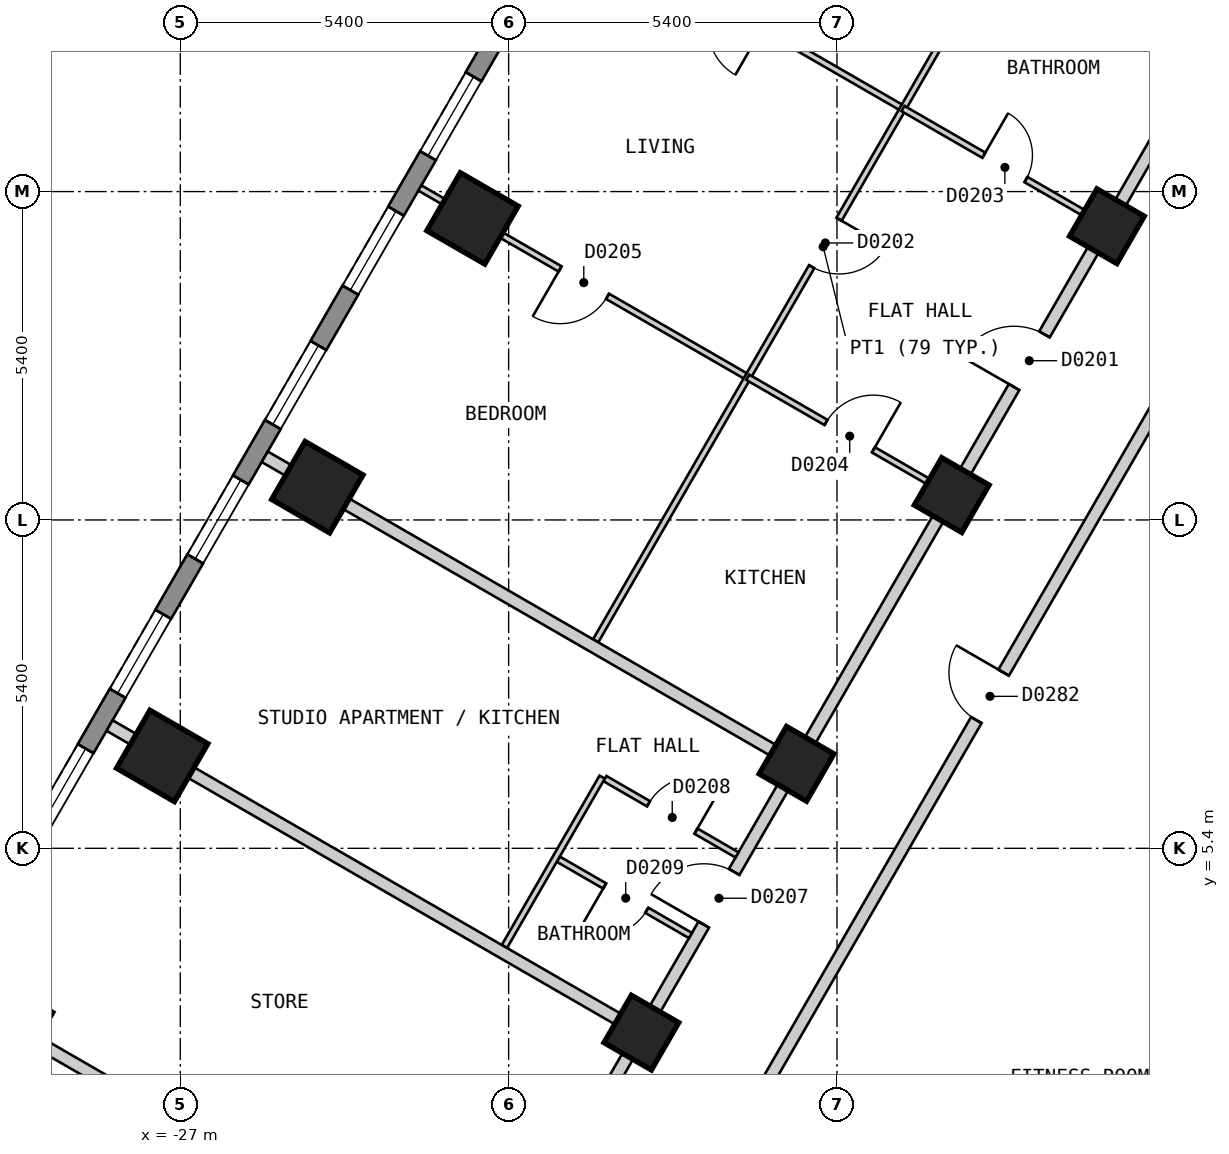
"""IFC4 building model, lengths in metres.
Left out: names, types, materials, properties, quantities, classifications, styles, units other than length and angle.
Written with IfcOpenShell. Run it as: python <this file> out.ifc"""

import sys

from ifc_helpers import new_model, si_unit, direction, frame, frame_2d, origin, origin_2d, place, context, subcontext, project, spatial, polyline, rectangle, outline, extrude, element, fill, save


model = new_model("IFC4")
c1 = context("Model", 3, precision=1e-05, world=origin(), true_north=direction((0.0, 1.0)))
c2 = subcontext(c1, "Body", "Model", "MODEL_VIEW")
j1 = project(units=[si_unit("LENGTHUNIT", "METRE"), si_unit("PLANEANGLEUNIT", "RADIAN")], contexts=[c1])
p1 = place(None, origin())
s1 = spatial("IfcSite", under=j1, at=p1, CompositionType="ELEMENT")
p2 = place(p1, origin())
s2 = spatial("IfcBuilding", under=s1, at=p2, CompositionType="ELEMENT")
p3 = place(p2, frame((0.0, 0.0, 41.4)))
s3 = spatial("IfcBuildingStorey", under=s2, at=p3, CompositionType="ELEMENT", Elevation=41.4)
for number, where, z_axis, x_axis in (
    (1, (-22.194, 15.759, 0.0), (0.0, 0.0, 1.0), (-0.5, -0.866, 0.0)),
    (2, (-24.746, 11.339, 0.0), (0.0, 0.0, 1.0), (-0.5, -0.866, 0.0)),
    (3, (-27.298, 6.919, 0.0), (0.0, 0.0, 1.0), (-0.5, -0.866, 0.0)),
    (4, (-29.849, 2.499, 0.0), (0.0, 0.0, 1.0), (-0.5, -0.866, 0.0)),
):
    element("IfcColumn", number, at=place(p3, frame(where, z_axis=z_axis, x_axis=x_axis)), inside=s3, PredefinedType="COLUMN", context=c2, shape_type="SweptSolid", body=[
        extrude(rectangle(XDim=1.1, YDim=1.1, at=origin_2d()), origin(), (0.0, 0.0, 1.0), 3.0),
    ])
for number, where, z_axis, x_axis in (
    (5, (-11.761, 15.63, 0.0), (0.0, 0.0, 1.0), (-0.5, -0.866, 0.0)),
    (6, (-14.313, 11.209, 0.0), (0.0, 0.0, 1.0), (-0.5, -0.866, 0.0)),
    (7, (-16.865, 6.789, 0.0), (0.0, 0.0, 1.0), (-0.5, -0.866, 0.0)),
    (8, (-19.417, 2.369, 0.0), (0.0, 0.0, 1.0), (-0.5, -0.866, 0.0)),
):
    element("IfcColumn", number, at=place(p3, frame(where, z_axis=z_axis, x_axis=x_axis)), inside=s3, PredefinedType="COLUMN", context=c2, shape_type="SweptSolid", body=[
        extrude(rectangle(XDim=0.9, YDim=0.9, at=origin_2d()), origin(), (0.0, 0.0, 1.0), 3.0),
    ])
p4 = place(p3, frame((-17.71, 25.825, 0.0), z_axis=(0.0, 0.0, 1.0), x_axis=(-0.500001938803, -0.866024284413, 0.0)))
e9 = element("IfcWall", 9, at=p4, inside=s3, PredefinedType="SOLIDWALL", context=c2, shape_type="SweptSolid", body=[
    extrude(outline(polyline([(0.0, -0.15), (27.02, -0.15), (26.94, 0.15), (0.08, 0.15), (0.0, -0.15)])), origin(), (0.0, 0.0, 1.0), 2.7),
])
p5 = place(p4, frame((1.277, 0.0, 0.15)))
e10 = element("IfcOpeningElement", 10, at=p5, cuts=e9, PredefinedType="OPENING", context=c2, shape_type="SweptSolid", body=[
    extrude(rectangle(XDim=1.5, YDim=2.1, at=frame_2d((0.75, 1.05))), frame((0.0, 0.16, 0.0), z_axis=(0.0, -1.0, 0.0), x_axis=(1.0, 0.0, 0.0)), (0.0, 0.0, 1.0), 0.32),
])
p6 = place(p4, frame((3.829, 0.0, 0.15)))
e11 = element("IfcOpeningElement", 11, at=p6, cuts=e9, PredefinedType="OPENING", context=c2, shape_type="SweptSolid", body=[
    extrude(rectangle(XDim=1.5, YDim=2.1, at=frame_2d((0.75, 1.05))), frame((0.0, 0.16, 0.0), z_axis=(0.0, -1.0, 0.0), x_axis=(1.0, 0.0, 0.0)), (0.0, 0.0, 1.0), 0.32),
])
p7 = place(p4, frame((6.382, 0.0, 0.15)))
e12 = element("IfcOpeningElement", 12, at=p7, cuts=e9, PredefinedType="OPENING", context=c2, shape_type="SweptSolid", body=[
    extrude(rectangle(XDim=1.5, YDim=2.1, at=frame_2d((0.75, 1.05))), frame((0.0, 0.16, 0.0), z_axis=(0.0, -1.0, 0.0), x_axis=(1.0, 0.0, 0.0)), (0.0, 0.0, 1.0), 0.32),
])
p8 = place(p4, frame((8.933, 0.0, 0.15)))
e13 = element("IfcOpeningElement", 13, at=p8, cuts=e9, PredefinedType="OPENING", context=c2, shape_type="SweptSolid", body=[
    extrude(rectangle(XDim=1.5, YDim=2.1, at=frame_2d((0.75, 1.05))), frame((0.0, 0.16, 0.0), z_axis=(0.0, -1.0, 0.0), x_axis=(1.0, 0.0, 0.0)), (0.0, 0.0, 1.0), 0.32),
])
p9 = place(p4, frame((11.485, 0.0, 0.15)))
e14 = element("IfcOpeningElement", 14, at=p9, cuts=e9, PredefinedType="OPENING", context=c2, shape_type="SweptSolid", body=[
    extrude(rectangle(XDim=1.5, YDim=2.1, at=frame_2d((0.75, 1.05))), frame((0.0, 0.16, 0.0), z_axis=(0.0, -1.0, 0.0), x_axis=(1.0, 0.0, 0.0)), (0.0, 0.0, 1.0), 0.32),
])
p10 = place(p4, frame((14.037, 0.0, 0.15)))
e15 = element("IfcOpeningElement", 15, at=p10, cuts=e9, PredefinedType="OPENING", context=c2, shape_type="SweptSolid", body=[
    extrude(rectangle(XDim=1.5, YDim=2.1, at=frame_2d((0.75, 1.05))), frame((0.0, 0.16, 0.0), z_axis=(0.0, -1.0, 0.0), x_axis=(1.0, 0.0, 0.0)), (0.0, 0.0, 1.0), 0.32),
])
p11 = place(p4, frame((16.589, 0.0, 0.15)))
e16 = element("IfcOpeningElement", 16, at=p11, cuts=e9, PredefinedType="OPENING", context=c2, shape_type="SweptSolid", body=[
    extrude(rectangle(XDim=1.5, YDim=2.1, at=frame_2d((0.75, 1.05))), frame((0.0, 0.16, 0.0), z_axis=(0.0, -1.0, 0.0), x_axis=(1.0, 0.0, 0.0)), (0.0, 0.0, 1.0), 0.32),
])
p12 = place(p4, frame((19.141, 0.0, 0.15)))
e17 = element("IfcOpeningElement", 17, at=p12, cuts=e9, PredefinedType="OPENING", context=c2, shape_type="SweptSolid", body=[
    extrude(rectangle(XDim=1.5, YDim=2.1, at=frame_2d((0.75, 1.05))), frame((0.0, 0.16, 0.0), z_axis=(0.0, -1.0, 0.0), x_axis=(1.0, 0.0, 0.0)), (0.0, 0.0, 1.0), 0.32),
])
p13 = place(p4, frame((21.693, 0.0, 0.15)))
e18 = element("IfcOpeningElement", 18, at=p13, cuts=e9, PredefinedType="OPENING", context=c2, shape_type="SweptSolid", body=[
    extrude(rectangle(XDim=1.5, YDim=2.1, at=frame_2d((0.75, 1.05))), frame((0.0, 0.16, 0.0), z_axis=(0.0, -1.0, 0.0), x_axis=(1.0, 0.0, 0.0)), (0.0, 0.0, 1.0), 0.32),
])
p14 = place(p4, frame((24.244, 0.0, 0.15)))
e19 = element("IfcOpeningElement", 19, at=p14, cuts=e9, PredefinedType="OPENING", context=c2, shape_type="SweptSolid", body=[
    extrude(rectangle(XDim=1.5, YDim=2.1, at=frame_2d((0.75, 1.05))), frame((0.0, 0.16, 0.0), z_axis=(0.0, -1.0, 0.0), x_axis=(1.0, 0.0, 0.0)), (0.0, 0.0, 1.0), 0.32),
])
p15 = place(p3, frame((-18.244, -0.001, 0.0), z_axis=(0.0, 0.0, 1.0), x_axis=(0.499962999376, 0.866046765051, 0.0)))
e20 = element("IfcWall", 20, at=p15, inside=s3, PredefinedType="PARTITIONING", context=c2, shape_type="SweptSolid", body=[
    extrude(rectangle(XDim=18.245, YDim=0.2, at=frame_2d((9.123, 0.0))), origin(), (0.0, 0.0, 1.0), 2.7),
])
p16 = place(p15, frame((8.672, 0.0, 0.0)))
e21 = element("IfcOpeningElement", 21, at=p16, cuts=e20, PredefinedType="OPENING", context=c2, shape_type="SweptSolid", body=[
    extrude(rectangle(XDim=0.9, YDim=2.1, at=frame_2d((0.45, 1.05))), frame((0.0, 0.11, 0.0), z_axis=(0.0, -1.0, 0.0), x_axis=(1.0, 0.0, 0.0)), (0.0, 0.0, 1.0), 0.22),
])
p17 = place(p3, frame((-20.727, 0.099, 0.0), z_axis=(0.0, 0.0, 1.0), x_axis=(0.499993204491, 0.866029327138, 0.0)))
e22 = element("IfcWall", 22, at=p17, inside=s3, PredefinedType="PARTITIONING", context=c2, shape_type="SweptSolid", body=[
    extrude(rectangle(XDim=20.554, YDim=0.2, at=frame_2d((10.277, 0.0))), origin(), (0.0, 0.0, 1.0), 2.7),
])
p18 = place(p17, frame((14.88, 0.0, 0.0)))
e23 = element("IfcOpeningElement", 23, at=p18, cuts=e22, PredefinedType="OPENING", context=c2, shape_type="SweptSolid", body=[
    extrude(rectangle(XDim=1.0, YDim=2.1, at=frame_2d((0.5, 1.05))), frame((0.0, 0.11, 0.0), z_axis=(0.0, -1.0, 0.0), x_axis=(1.0, 0.0, 0.0)), (0.0, 0.0, 1.0), 0.22),
])
p19 = place(p17, frame((4.673, 0.0, 0.0)))
e24 = element("IfcOpeningElement", 24, at=p19, cuts=e22, PredefinedType="OPENING", context=c2, shape_type="SweptSolid", body=[
    extrude(rectangle(XDim=1.0, YDim=2.1, at=frame_2d((0.5, 1.05))), frame((0.0, 0.11, 0.0), z_axis=(0.0, -1.0, 0.0), x_axis=(1.0, 0.0, 0.0)), (0.0, 0.0, 1.0), 0.22),
])
p20 = place(p17, frame((0.838, 0.0, 0.0)))
e25 = element("IfcOpeningElement", 25, at=p20, cuts=e22, PredefinedType="OPENING", context=c2, shape_type="SweptSolid", body=[
    extrude(rectangle(XDim=0.8, YDim=2.1, at=frame_2d((0.4, 1.05))), frame((0.0, 0.11, 0.0), z_axis=(0.0, -1.0, 0.0), x_axis=(1.0, 0.0, 0.0)), (0.0, 0.0, 1.0), 0.22),
])
p21 = place(p3, frame((-20.017, 6.547, 0.0), z_axis=(0.0, 0.0, 1.0), x_axis=(0.865940918122, -0.500146304917, 0.0)))
e26 = element("IfcWall", 26, at=p21, inside=s3, PredefinedType="PARTITIONING", context=c2, shape_type="SweptSolid", body=[
    extrude(rectangle(XDim=2.51, YDim=0.1, at=frame_2d((1.255, 0.0))), origin(), (0.0, 0.0, 1.0), 2.7),
])
p22 = place(p21, frame((0.829, 0.0, 0.0)))
e27 = element("IfcOpeningElement", 27, at=p22, cuts=e26, PredefinedType="OPENING", context=c2, shape_type="SweptSolid", body=[
    extrude(rectangle(XDim=0.9, YDim=2.1, at=frame_2d((0.45, 1.05))), frame((0.0, 0.06, 0.0), z_axis=(0.0, -1.0, 0.0), x_axis=(1.0, 0.0, 0.0)), (0.0, 0.0, 1.0), 0.12),
])
p23 = place(p3, frame((-20.783, 5.221, 0.0), z_axis=(0.0, 0.0, 1.0), x_axis=(0.865958718457, -0.500115484592, 0.0)))
e28 = element("IfcWall", 28, at=p23, inside=s3, PredefinedType="PARTITIONING", context=c2, shape_type="SweptSolid", body=[
    extrude(rectangle(XDim=2.509, YDim=0.1, at=frame_2d((1.255, 0.0))), origin(), (0.0, 0.0, 1.0), 2.7),
])
p24 = place(p23, frame((0.88, 0.0, 0.0)))
e29 = element("IfcOpeningElement", 29, at=p24, cuts=e28, PredefinedType="OPENING", context=c2, shape_type="SweptSolid", body=[
    extrude(rectangle(XDim=0.8, YDim=2.1, at=frame_2d((0.4, 1.05))), frame((0.0, 0.06, 0.0), z_axis=(0.0, -1.0, 0.0), x_axis=(1.0, 0.0, 0.0)), (0.0, 0.0, 1.0), 0.12),
])
p25 = place(p3, frame((-20.508, 20.679, 0.0), z_axis=(0.0, 0.0, 1.0), x_axis=(0.86607068519, -0.499921562103, 0.0)))
e30 = element("IfcWall", 30, at=p25, inside=s3, PredefinedType="PARTITIONING", context=c2, shape_type="SweptSolid", body=[
    extrude(rectangle(XDim=6.227, YDim=0.1, at=frame_2d((3.114, 0.0))), origin(), (0.0, 0.0, 1.0), 2.7),
])
p26 = place(p25, frame((2.663, 0.0, 0.0)))
e31 = element("IfcOpeningElement", 31, at=p26, cuts=e30, PredefinedType="OPENING", context=c2, shape_type="SweptSolid", body=[
    extrude(rectangle(XDim=0.9, YDim=2.1, at=frame_2d((0.45, 1.05))), frame((0.0, 0.06, 0.0), z_axis=(0.0, -1.0, 0.0), x_axis=(1.0, 0.0, 0.0)), (0.0, 0.0, 1.0), 0.12),
])
p27 = place(p3, frame((-23.06, 16.259, 0.0), z_axis=(0.0, 0.0, 1.0), x_axis=(0.86607068519, -0.499921562103, 0.0)))
e32 = element("IfcWall", 32, at=p27, inside=s3, PredefinedType="PARTITIONING", context=c2, shape_type="SweptSolid", body=[
    extrude(rectangle(XDim=6.227, YDim=0.1, at=frame_2d((3.114, 0.0))), origin(), (0.0, 0.0, 1.0), 2.7),
])
p28 = place(p27, frame((2.663, 0.0, 0.0)))
e33 = element("IfcOpeningElement", 33, at=p28, cuts=e32, PredefinedType="OPENING", context=c2, shape_type="SweptSolid", body=[
    extrude(rectangle(XDim=0.9, YDim=2.1, at=frame_2d((0.45, 1.05))), frame((0.0, 0.06, 0.0), z_axis=(0.0, -1.0, 0.0), x_axis=(1.0, 0.0, 0.0)), (0.0, 0.0, 1.0), 0.12),
])
p29 = place(p3, frame((-21.669, 3.787, 0.0), z_axis=(0.0, 0.0, 1.0), x_axis=(0.499913121084, 0.86607555754, 0.0)))
e34 = element("IfcWall", 34, at=p29, inside=s3, PredefinedType="PARTITIONING", context=c2, shape_type="SweptSolid", body=[
    extrude(rectangle(XDim=3.214, YDim=0.1, at=frame_2d((1.607, 0.0))), origin(), (0.0, 0.0, 1.0), 2.7),
])
p30 = place(p3, frame((-20.169, 8.812, 0.0), z_axis=(0.0, 0.0, 1.0), x_axis=(0.499995459772, 0.86602802507, 0.0)))
e35 = element("IfcWall", 35, at=p30, inside=s3, PredefinedType="PARTITIONING", context=c2, shape_type="SweptSolid", body=[
    extrude(rectangle(XDim=14.966, YDim=0.1, at=frame_2d((7.483, 0.0))), origin(), (0.0, 0.0, 1.0), 2.7),
])
p31 = place(p30, frame((7.105, 0.0, 0.0)))
e36 = element("IfcOpeningElement", 36, at=p31, cuts=e35, PredefinedType="OPENING", context=c2, shape_type="SweptSolid", body=[
    extrude(rectangle(XDim=0.9, YDim=2.1, at=frame_2d((0.45, 1.05))), frame((0.0, 0.06, 0.0), z_axis=(0.0, -1.0, 0.0), x_axis=(1.0, 0.0, 0.0)), (0.0, 0.0, 1.0), 0.12),
])
p32 = place(p3, frame((-12.659, 21.926, 0.0), z_axis=(0.0, 0.0, 1.0), x_axis=(0.500025458316, -0.86601070492, 0.0)))
e37 = element("IfcWall", 37, at=p32, inside=s3, PredefinedType="PARTITIONING", context=c2, shape_type="SweptSolid", body=[
    extrude(rectangle(XDim=4.533, YDim=0.2, at=frame_2d((2.267, 0.0))), origin(), (0.0, 0.0, 1.0), 2.7),
])
p33 = place(p3, frame((-28.163, 7.419, 0.0), z_axis=(0.0, 0.0, 1.0), x_axis=(0.866022959057, -0.500004234368, 0.0)))
e38 = element("IfcWall", 38, at=p33, inside=s3, PredefinedType="PARTITIONING", context=c2, shape_type="SweptSolid", body=[
    extrude(rectangle(XDim=10.0, YDim=0.2, at=frame_2d((5.0, 0.0))), origin(), (0.0, 0.0, 1.0), 2.7),
])
p34 = place(p3, frame((-30.716, 2.999, 0.0), z_axis=(0.0, 0.0, 1.0), x_axis=(0.866032775405, -0.499987231761, 0.0)))
e39 = element("IfcWall", 39, at=p34, inside=s3, PredefinedType="PARTITIONING", context=c2, shape_type="SweptSolid", body=[
    extrude(rectangle(XDim=5.8, YDim=0.2, at=frame_2d((2.9, 0.0))), origin(), (0.0, 0.0, 1.0), 2.7),
])
p35 = place(p3, frame((-25.611, 11.839, 0.0), z_axis=(0.0, 0.0, 1.0), x_axis=(0.866022959057, -0.500004234368, 0.0)))
e40 = element("IfcWall", 40, at=p35, inside=s3, PredefinedType="PARTITIONING", context=c2, shape_type="SweptSolid", body=[
    extrude(rectangle(XDim=10.0, YDim=0.2, at=frame_2d((5.0, 0.0))), origin(), (0.0, 0.0, 1.0), 2.7),
])
p36 = place(p3, frame((-15.115, 17.566, 0.0), z_axis=(0.0, 0.0, 1.0), x_axis=(0.866008894869, -0.50002859319, 0.0)))
e41 = element("IfcWall", 41, at=p36, inside=s3, PredefinedType="PARTITIONING", context=c2, shape_type="SweptSolid", body=[
    extrude(rectangle(XDim=3.774, YDim=0.1, at=frame_2d((1.887, 0.0))), origin(), (0.0, 0.0, 1.0), 2.7),
])
p37 = place(p36, frame((1.536, 0.0, 0.0)))
e42 = element("IfcOpeningElement", 42, at=p37, cuts=e41, PredefinedType="OPENING", context=c2, shape_type="SweptSolid", body=[
    extrude(rectangle(XDim=0.8, YDim=2.1, at=frame_2d((0.4, 1.05))), frame((0.0, 0.06, 0.0), z_axis=(0.0, -1.0, 0.0), x_axis=(1.0, 0.0, 0.0)), (0.0, 0.0, 1.0), 0.12),
])
p38 = place(p3, frame((-17.667, 13.146, 0.0), z_axis=(0.0, 0.0, 1.0), x_axis=(0.866008894869, -0.50002859319, 0.0)))
e43 = element("IfcWall", 43, at=p38, inside=s3, PredefinedType="PARTITIONING", context=c2, shape_type="SweptSolid", body=[
    extrude(rectangle(XDim=3.774, YDim=0.1, at=frame_2d((1.887, 0.0))), origin(), (0.0, 0.0, 1.0), 2.7),
])
p39 = place(p38, frame((1.486, 0.0, 0.0)))
e44 = element("IfcOpeningElement", 44, at=p39, cuts=e43, PredefinedType="OPENING", context=c2, shape_type="SweptSolid", body=[
    extrude(rectangle(XDim=0.9, YDim=2.1, at=frame_2d((0.45, 1.05))), frame((0.0, 0.06, 0.0), z_axis=(0.0, -1.0, 0.0), x_axis=(1.0, 0.0, 0.0)), (0.0, 0.0, 1.0), 0.12),
])
p40 = place(p8, origin())
e45 = element("IfcWindow", 45, at=p40, inside=s3, PartitioningType="SINGLE_PANEL", PredefinedType="WINDOW", context=c2, shape_type="SweptSolid", body=[
    extrude(rectangle(XDim=1.5, YDim=2.1, at=frame_2d((0.75, 1.05))), frame((0.0, 0.03, 0.0), z_axis=(0.0, -1.0, 0.0), x_axis=(1.0, 0.0, 0.0)), (0.0, 0.0, 1.0), 0.06),
])
fill(e13, e45)
p41 = place(p9, origin())
e46 = element("IfcWindow", 46, at=p41, inside=s3, PartitioningType="SINGLE_PANEL", PredefinedType="WINDOW", context=c2, shape_type="SweptSolid", body=[
    extrude(rectangle(XDim=1.5, YDim=2.1, at=frame_2d((0.75, 1.05))), frame((0.0, 0.03, 0.0), z_axis=(0.0, -1.0, 0.0), x_axis=(1.0, 0.0, 0.0)), (0.0, 0.0, 1.0), 0.06),
])
fill(e14, e46)
p42 = place(p10, origin())
e47 = element("IfcWindow", 47, at=p42, inside=s3, PartitioningType="SINGLE_PANEL", PredefinedType="WINDOW", context=c2, shape_type="SweptSolid", body=[
    extrude(rectangle(XDim=1.5, YDim=2.1, at=frame_2d((0.75, 1.05))), frame((0.0, 0.03, 0.0), z_axis=(0.0, -1.0, 0.0), x_axis=(1.0, 0.0, 0.0)), (0.0, 0.0, 1.0), 0.06),
])
fill(e15, e47)
p43 = place(p11, origin())
e48 = element("IfcWindow", 48, at=p43, inside=s3, PartitioningType="SINGLE_PANEL", PredefinedType="WINDOW", context=c2, shape_type="SweptSolid", body=[
    extrude(rectangle(XDim=1.5, YDim=2.1, at=frame_2d((0.75, 1.05))), frame((0.0, 0.03, 0.0), z_axis=(0.0, -1.0, 0.0), x_axis=(1.0, 0.0, 0.0)), (0.0, 0.0, 1.0), 0.06),
])
fill(e16, e48)
p44 = place(p12, origin())
e49 = element("IfcWindow", 49, at=p44, inside=s3, PartitioningType="SINGLE_PANEL", PredefinedType="WINDOW", context=c2, shape_type="SweptSolid", body=[
    extrude(rectangle(XDim=1.5, YDim=2.1, at=frame_2d((0.75, 1.05))), frame((0.0, 0.03, 0.0), z_axis=(0.0, -1.0, 0.0), x_axis=(1.0, 0.0, 0.0)), (0.0, 0.0, 1.0), 0.06),
])
fill(e17, e49)
p45 = place(p13, origin())
e50 = element("IfcWindow", 50, at=p45, inside=s3, PartitioningType="SINGLE_PANEL", PredefinedType="WINDOW", context=c2, shape_type="SweptSolid", body=[
    extrude(rectangle(XDim=1.5, YDim=2.1, at=frame_2d((0.75, 1.05))), frame((0.0, 0.03, 0.0), z_axis=(0.0, -1.0, 0.0), x_axis=(1.0, 0.0, 0.0)), (0.0, 0.0, 1.0), 0.06),
])
fill(e18, e50)
p46 = place(p18, origin())
e51 = element("IfcDoor", 51, at=p46, inside=s3, OperationType="SINGLE_SWING_LEFT", PredefinedType="DOOR", context=c2, shape_type="SweptSolid", body=[
    extrude(rectangle(XDim=1.0, YDim=2.1, at=frame_2d((0.5, 1.05))), frame((0.0, 0.025, 0.0), z_axis=(0.0, -1.0, 0.0), x_axis=(1.0, 0.0, 0.0)), (0.0, 0.0, 1.0), 0.05),
])
fill(e23, e51)
p47 = place(p31, origin())
e52 = element("IfcDoor", 52, at=p47, inside=s3, OperationType="SINGLE_SWING_RIGHT", PredefinedType="DOOR", context=c2, shape_type="SweptSolid", body=[
    extrude(rectangle(XDim=0.9, YDim=2.1, at=frame_2d((0.45, 1.05))), frame((0.0, 0.025, 0.0), z_axis=(0.0, -1.0, 0.0), x_axis=(1.0, 0.0, 0.0)), (0.0, 0.0, 1.0), 0.05),
])
fill(e36, e52)
p48 = place(p37, origin())
e53 = element("IfcDoor", 53, at=p48, inside=s3, OperationType="SINGLE_SWING_LEFT", PredefinedType="DOOR", context=c2, shape_type="SweptSolid", body=[
    extrude(rectangle(XDim=0.8, YDim=2.1, at=frame_2d((0.4, 1.05))), frame((0.0, 0.025, 0.0), z_axis=(0.0, -1.0, 0.0), x_axis=(1.0, 0.0, 0.0)), (0.0, 0.0, 1.0), 0.05),
])
fill(e42, e53)
p49 = place(p39, origin())
e54 = element("IfcDoor", 54, at=p49, inside=s3, OperationType="SINGLE_SWING_RIGHT", PredefinedType="DOOR", context=c2, shape_type="SweptSolid", body=[
    extrude(rectangle(XDim=0.9, YDim=2.1, at=frame_2d((0.45, 1.05))), frame((0.0, 0.025, 0.0), z_axis=(0.0, -1.0, 0.0), x_axis=(1.0, 0.0, 0.0)), (0.0, 0.0, 1.0), 0.05),
])
fill(e44, e54)
p50 = place(p28, origin())
e55 = element("IfcDoor", 55, at=p50, inside=s3, OperationType="SINGLE_SWING_LEFT", PredefinedType="DOOR", context=c2, shape_type="SweptSolid", body=[
    extrude(rectangle(XDim=0.9, YDim=2.1, at=frame_2d((0.45, 1.05))), frame((0.0, 0.025, 0.0), z_axis=(0.0, -1.0, 0.0), x_axis=(1.0, 0.0, 0.0)), (0.0, 0.0, 1.0), 0.05),
])
fill(e33, e55)
p51 = place(p19, origin())
e56 = element("IfcDoor", 56, at=p51, inside=s3, OperationType="SINGLE_SWING_LEFT", PredefinedType="DOOR", context=c2, shape_type="SweptSolid", body=[
    extrude(rectangle(XDim=1.0, YDim=2.1, at=frame_2d((0.5, 1.05))), frame((0.0, 0.025, 0.0), z_axis=(0.0, -1.0, 0.0), x_axis=(1.0, 0.0, 0.0)), (0.0, 0.0, 1.0), 0.05),
])
fill(e24, e56)
p52 = place(p22, origin())
e57 = element("IfcDoor", 57, at=p52, inside=s3, OperationType="SINGLE_SWING_RIGHT", PredefinedType="DOOR", context=c2, shape_type="SweptSolid", body=[
    extrude(rectangle(XDim=0.9, YDim=2.1, at=frame_2d((0.45, 1.05))), frame((0.0, 0.025, 0.0), z_axis=(0.0, -1.0, 0.0), x_axis=(1.0, 0.0, 0.0)), (0.0, 0.0, 1.0), 0.05),
])
fill(e27, e57)
p53 = place(p24, origin())
e58 = element("IfcDoor", 58, at=p53, inside=s3, OperationType="SINGLE_SWING_LEFT", PredefinedType="DOOR", context=c2, shape_type="SweptSolid", body=[
    extrude(rectangle(XDim=0.8, YDim=2.1, at=frame_2d((0.4, 1.05))), frame((0.0, 0.025, 0.0), z_axis=(0.0, -1.0, 0.0), x_axis=(1.0, 0.0, 0.0)), (0.0, 0.0, 1.0), 0.05),
])
fill(e29, e58)
p54 = place(p16, origin())
e59 = element("IfcDoor", 59, at=p54, inside=s3, OperationType="SINGLE_SWING_RIGHT", PredefinedType="DOOR", context=c2, shape_type="SweptSolid", body=[
    extrude(rectangle(XDim=0.9, YDim=2.1, at=frame_2d((0.45, 1.05))), frame((0.0, 0.025, 0.0), z_axis=(0.0, -1.0, 0.0), x_axis=(1.0, 0.0, 0.0)), (0.0, 0.0, 1.0), 0.05),
])
fill(e21, e59)
save(model, sys.argv[1])
